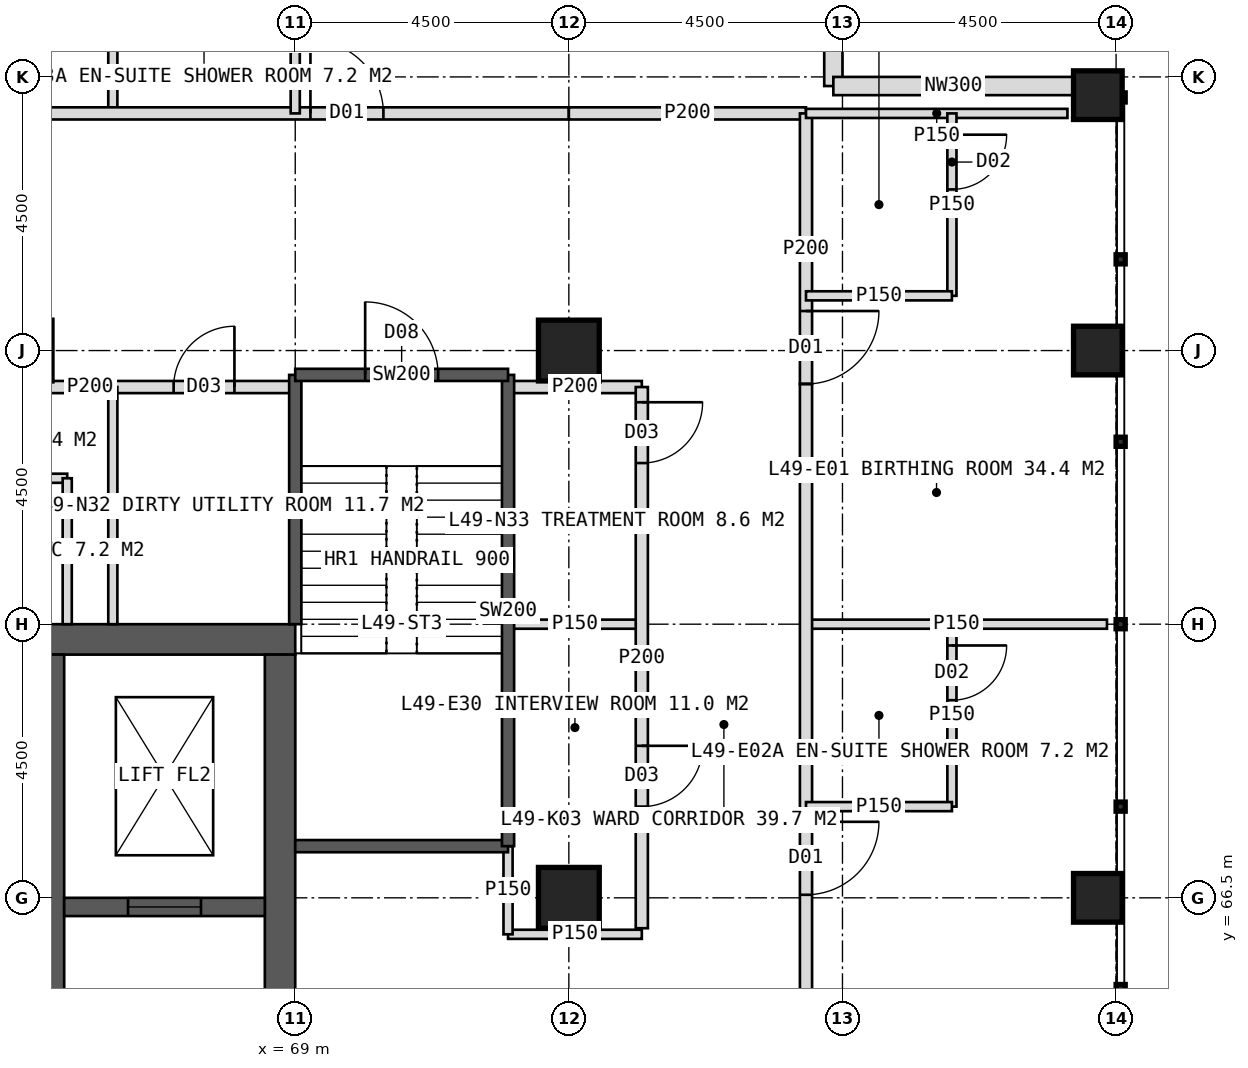
"""IFC4 building model, lengths in metres.
Left out: names, types, materials, properties, quantities, classifications, styles, units other than length and angle.
Written with IfcOpenShell. Run it as: python <this file> out.ifc"""

import sys

from ifc_helpers import new_model, si_unit, direction, frame, frame_2d, origin, origin_2d, place, context, subcontext, project, spatial, rectangle, hollow_rectangle, extrude, element, fill, save


model = new_model("IFC4")
c1 = context("Model", 3, precision=1e-05, world=origin(), true_north=direction((0.0, 1.0)))
c2 = subcontext(c1, "Body", "Model", "MODEL_VIEW")
j1 = project(units=[si_unit("LENGTHUNIT", "METRE"), si_unit("PLANEANGLEUNIT", "RADIAN")], contexts=[c1])
p1 = place(None, origin())
s1 = spatial("IfcSite", under=j1, at=p1, CompositionType="ELEMENT")
p2 = place(p1, origin())
s2 = spatial("IfcBuilding", under=s1, at=p2, CompositionType="ELEMENT")
p3 = place(p2, frame((0.0, 0.0, 205.0)))
s3 = spatial("IfcBuildingStorey", under=s2, at=p3, CompositionType="ELEMENT", Elevation=205.0)
p4 = place(p3, frame((51.0, 70.75, 0.0), z_axis=(0.0, 0.0, 1.0), x_axis=(1.0, 0.0, 0.0)))
e1 = element("IfcWall", 1, at=p4, inside=s3, PredefinedType="SHEAR", context=c2, shape_type="SweptSolid", body=[
    extrude(rectangle(XDim=18.0, YDim=0.5, at=frame_2d((9.0, 0.0))), origin(), (0.0, 0.0, 1.0), 4.0),
])
p5 = place(p4, frame((8.1, 0.0, 0.0)))
e2 = element("IfcOpeningElement", 2, at=p5, cuts=e1, PredefinedType="OPENING", context=c2, shape_type="SweptSolid", body=[
    extrude(rectangle(XDim=1.8, YDim=2.2, at=frame_2d((0.9, 1.1))), frame((0.0, 0.26, 0.0), z_axis=(0.0, -1.0, 0.0), x_axis=(1.0, 0.0, 0.0)), (0.0, 0.0, 1.0), 0.52),
])
p6 = place(p3, frame((68.75, 53.5, 0.0), z_axis=(0.0, 0.0, 1.0), x_axis=(0.0, 1.0, 0.0)))
e3 = element("IfcWall", 3, at=p6, inside=s3, PredefinedType="SHEAR", context=c2, shape_type="SweptSolid", body=[
    extrude(rectangle(XDim=17.0, YDim=0.5, at=frame_2d((8.5, 0.0))), origin(), (0.0, 0.0, 1.0), 4.0),
])
p7 = place(p6, frame((9.6, 0.0, 0.0)))
e4 = element("IfcOpeningElement", 4, at=p7, cuts=e3, PredefinedType="OPENING", context=c2, shape_type="SweptSolid", body=[
    extrude(rectangle(XDim=1.5, YDim=2.2, at=frame_2d((0.75, 1.1))), frame((0.0, 0.26, 0.0), z_axis=(0.0, -1.0, 0.0), x_axis=(1.0, 0.0, 0.0)), (0.0, 0.0, 1.0), 0.52),
])
p8 = place(p3, frame((65.05, 53.5, 0.0), z_axis=(0.0, 0.0, 1.0), x_axis=(0.0, 1.0, 0.0)))
e5 = element("IfcWall", 5, at=p8, inside=s3, PredefinedType="SHEAR", context=c2, shape_type="SweptSolid", body=[
    extrude(rectangle(XDim=17.0, YDim=0.3, at=frame_2d((8.5, 0.0))), origin(), (0.0, 0.0, 1.0), 4.0),
])
p9 = place(p3, frame((65.2, 66.35, 0.0), z_axis=(0.0, 0.0, 1.0), x_axis=(1.0, 0.0, 0.0)))
e6 = element("IfcWall", 6, at=p9, inside=s3, PredefinedType="SHEAR", context=c2, shape_type="SweptSolid", body=[
    extrude(rectangle(XDim=3.3, YDim=0.3, at=frame_2d((1.65, 0.0))), origin(), (0.0, 0.0, 1.0), 4.0),
])
p10 = place(p9, frame((1.05, 0.0, 0.0)))
e7 = element("IfcOpeningElement", 7, at=p10, cuts=e6, PredefinedType="OPENING", context=c2, shape_type="SweptSolid", body=[
    extrude(rectangle(XDim=1.2, YDim=2.2, at=frame_2d((0.6, 1.1))), frame((0.0, 0.16, 0.0), z_axis=(0.0, -1.0, 0.0), x_axis=(1.0, 0.0, 0.0)), (0.0, 0.0, 1.0), 0.32),
])
for number, where, z_axis, x_axis in (
    (8, (73.5, 75.5, 0.0), (0.0, 0.0, 1.0), (1.0, 0.0, 0.0)),
    (9, (73.5, 66.5, 0.0), (0.0, 0.0, 1.0), (1.0, 0.0, 0.0)),
):
    element("IfcColumn", number, at=place(p3, frame(where, z_axis=z_axis, x_axis=x_axis)), inside=s3, PredefinedType="COLUMN", context=c2, shape_type="SweptSolid", body=[
        extrude(hollow_rectangle(XDim=1.0, YDim=1.0, WallThickness=0.1, at=origin_2d()), origin(), (0.0, 0.0, 1.0), 4.0),
    ])
for number, where, z_axis, x_axis in (
    (10, (82.2, 66.5, 0.0), (0.0, 0.0, 1.0), (1.0, 0.0, 0.0)),
    (11, (82.2, 75.5, 0.0), (0.0, 0.0, 1.0), (1.0, 0.0, 0.0)),
    (12, (82.2, 79.7, 0.0), (0.0, 0.0, 1.0), (1.0, 0.0, 0.0)),
):
    element("IfcColumn", number, at=place(p3, frame(where, z_axis=z_axis, x_axis=x_axis)), inside=s3, PredefinedType="COLUMN", context=c2, shape_type="SweptSolid", body=[
        extrude(hollow_rectangle(XDim=0.8, YDim=0.8, WallThickness=0.08, at=origin_2d()), origin(), (0.0, 0.0, 1.0), 4.0),
    ])
for number, where, z_axis, x_axis in (
    (13, (77.85, 83.8, 0.0), (0.0, 0.0, 1.0), (0.0, -1.0, 0.0)),
    (14, (77.85, 79.85, 0.0), (0.0, 0.0, 1.0), (1.0, 0.0, 0.0)),
):
    element("IfcWall", number, at=place(p3, frame(where, z_axis=z_axis, x_axis=x_axis)), inside=s3, PredefinedType="ELEMENTEDWALL", context=c2, shape_type="SweptSolid", body=[
        extrude(rectangle(XDim=3.95, YDim=0.3, at=frame_2d((1.975, 0.0))), origin(), (0.0, 0.0, 1.0), 2.85),
    ])
p11 = place(p3, frame((66.0, 79.4, 0.0), z_axis=(0.0, 0.0, 1.0), x_axis=(0.0, 1.0, 0.0)))
e15 = element("IfcWall", 15, at=p11, inside=s3, PredefinedType="PARTITIONING", context=c2, shape_type="SweptSolid", body=[
    extrude(rectangle(XDim=4.95, YDim=0.15, at=frame_2d((2.475, 0.0))), origin(), (0.0, 0.0, 1.0), 3.75),
])
p12 = place(p3, frame((47.05, 79.4, 0.0), z_axis=(0.0, 0.0, 1.0), x_axis=(1.0, 0.0, 0.0)))
e16 = element("IfcWall", 16, at=p12, inside=s3, PredefinedType="PARTITIONING", context=c2, shape_type="SweptSolid", body=[
    extrude(rectangle(XDim=26.45, YDim=0.2, at=frame_2d((13.225, 0.0))), origin(), (0.0, 0.0, 1.0), 3.75),
])
p13 = place(p12, frame((12.45, 0.0, 0.0)))
e17 = element("IfcOpeningElement", 17, at=p13, cuts=e16, PredefinedType="OPENING", context=c2, shape_type="SweptSolid", body=[
    extrude(rectangle(XDim=1.0, YDim=2.1, at=frame_2d((0.5, 1.05))), frame((0.0, 0.11, 0.0), z_axis=(0.0, -1.0, 0.0), x_axis=(1.0, 0.0, 0.0)), (0.0, 0.0, 1.0), 0.22),
])
p14 = place(p12, frame((22.2, 0.0, 0.0)))
e18 = element("IfcOpeningElement", 18, at=p14, cuts=e16, PredefinedType="OPENING", context=c2, shape_type="SweptSolid", body=[
    extrude(rectangle(XDim=1.2, YDim=2.2, at=frame_2d((0.6, 1.1))), frame((0.0, 0.11, 0.0), z_axis=(0.0, -1.0, 0.0), x_axis=(1.0, 0.0, 0.0)), (0.0, 0.0, 1.0), 0.22),
])
p15 = place(p3, frame((73.5, 79.4, 0.0), z_axis=(0.0, 0.0, 1.0), x_axis=(1.0, 0.0, 0.0)))
e19 = element("IfcWall", 19, at=p15, inside=s3, PredefinedType="PARTITIONING", context=c2, shape_type="SweptSolid", body=[
    extrude(rectangle(XDim=3.9, YDim=0.2, at=frame_2d((1.95, 0.0))), origin(), (0.0, 0.0, 1.0), 2.85),
])
p16 = place(p3, frame((69.0, 79.4, 0.0), z_axis=(0.0, 0.0, 1.0), x_axis=(0.0, 1.0, 0.0)))
e20 = element("IfcWall", 20, at=p16, inside=s3, PredefinedType="PARTITIONING", context=c2, shape_type="SweptSolid", body=[
    extrude(rectangle(XDim=2.4, YDim=0.15, at=frame_2d((1.2, 0.0))), origin(), (0.0, 0.0, 1.0), 3.75),
])
p17 = place(p3, frame((62.25, 74.9, 0.0), z_axis=(0.0, 0.0, 1.0), x_axis=(1.0, 0.0, 0.0)))
e21 = element("IfcWall", 21, at=p17, inside=s3, PredefinedType="PARTITIONING", context=c2, shape_type="SweptSolid", body=[
    extrude(rectangle(XDim=6.75, YDim=0.2, at=frame_2d((3.375, 0.0))), origin(), (0.0, 0.0, 1.0), 3.75),
])
p18 = place(p17, frame((0.325, 0.0, 0.0)))
e22 = element("IfcOpeningElement", 22, at=p18, cuts=e21, PredefinedType="OPENING", context=c2, shape_type="SweptSolid", body=[
    extrude(rectangle(XDim=1.0, YDim=2.1, at=frame_2d((0.5, 1.05))), frame((0.0, 0.11, 0.0), z_axis=(0.0, -1.0, 0.0), x_axis=(1.0, 0.0, 0.0)), (0.0, 0.0, 1.0), 0.22),
])
p19 = place(p17, frame((4.75, 0.0, 0.0)))
e23 = element("IfcOpeningElement", 23, at=p19, cuts=e21, PredefinedType="OPENING", context=c2, shape_type="SweptSolid", body=[
    extrude(rectangle(XDim=1.0, YDim=2.1, at=frame_2d((0.5, 1.05))), frame((0.0, 0.11, 0.0), z_axis=(0.0, -1.0, 0.0), x_axis=(1.0, 0.0, 0.0)), (0.0, 0.0, 1.0), 0.22),
])
p20 = place(p3, frame((72.5, 74.9, 0.0), z_axis=(0.0, 0.0, 1.0), x_axis=(1.0, 0.0, 0.0)))
e24 = element("IfcWall", 24, at=p20, inside=s3, PredefinedType="PARTITIONING", context=c2, shape_type="SweptSolid", body=[
    extrude(rectangle(XDim=2.2, YDim=0.2, at=frame_2d((1.1, 0.0))), origin(), (0.0, 0.0, 1.0), 3.75),
])
p21 = place(p3, frame((66.0, 71.0, 0.0), z_axis=(0.0, 0.0, 1.0), x_axis=(0.0, 1.0, 0.0)))
e25 = element("IfcWall", 25, at=p21, inside=s3, PredefinedType="PARTITIONING", context=c2, shape_type="SweptSolid", body=[
    extrude(rectangle(XDim=3.9, YDim=0.15, at=frame_2d((1.95, 0.0))), origin(), (0.0, 0.0, 1.0), 3.75),
])
p22 = place(p3, frame((62.25, 73.4, 0.0), z_axis=(0.0, 0.0, 1.0), x_axis=(1.0, 0.0, 0.0)))
e26 = element("IfcWall", 26, at=p22, inside=s3, PredefinedType="PARTITIONING", context=c2, shape_type="SweptSolid", body=[
    extrude(rectangle(XDim=3.0, YDim=0.15, at=frame_2d((1.5, 0.0))), origin(), (0.0, 0.0, 1.0), 3.75),
])
p23 = place(p3, frame((65.25, 71.0, 0.0), z_axis=(0.0, 0.0, 1.0), x_axis=(0.0, 1.0, 0.0)))
e27 = element("IfcWall", 27, at=p23, inside=s3, PredefinedType="PARTITIONING", context=c2, shape_type="SweptSolid", body=[
    extrude(rectangle(XDim=2.4, YDim=0.15, at=frame_2d((1.2, 0.0))), origin(), (0.0, 0.0, 1.0), 3.75),
])
p24 = place(p3, frame((77.4, 71.0, 0.0), z_axis=(0.0, 0.0, 1.0), x_axis=(1.0, 0.0, 0.0)))
e28 = element("IfcWall", 28, at=p24, inside=s3, PredefinedType="PARTITIONING", context=c2, shape_type="SweptSolid", body=[
    extrude(rectangle(XDim=4.95, YDim=0.15, at=frame_2d((2.475, 0.0))), origin(), (0.0, 0.0, 1.0), 3.75),
])
p25 = place(p3, frame((77.4, 79.4, 0.0), z_axis=(0.0, 0.0, 1.0), x_axis=(0.0, -1.0, 0.0)))
e29 = element("IfcWall", 29, at=p25, inside=s3, PredefinedType="PARTITIONING", context=c2, shape_type="SweptSolid", body=[
    extrude(rectangle(XDim=4.45, YDim=0.2, at=frame_2d((2.225, 0.0))), origin(), (0.0, 0.0, 1.0), 2.85),
])
p26 = place(p25, frame((3.25, 0.0, 0.0)))
e30 = element("IfcOpeningElement", 30, at=p26, cuts=e29, PredefinedType="OPENING", context=c2, shape_type="SweptSolid", body=[
    extrude(rectangle(XDim=1.2, YDim=2.2, at=frame_2d((0.6, 1.1))), frame((0.0, 0.11, 0.0), z_axis=(0.0, -1.0, 0.0), x_axis=(1.0, 0.0, 0.0)), (0.0, 0.0, 1.0), 0.22),
])
p27 = place(p3, frame((77.4, 74.95, 0.0), z_axis=(0.0, 0.0, 1.0), x_axis=(0.0, -1.0, 0.0)))
e31 = element("IfcWall", 31, at=p27, inside=s3, PredefinedType="PARTITIONING", context=c2, shape_type="SweptSolid", body=[
    extrude(rectangle(XDim=26.45, YDim=0.2, at=frame_2d((13.225, 0.0))), origin(), (0.0, 0.0, 1.0), 3.75),
])
p28 = place(p27, frame((7.2, 0.0, 0.0)))
e32 = element("IfcOpeningElement", 32, at=p28, cuts=e31, PredefinedType="OPENING", context=c2, shape_type="SweptSolid", body=[
    extrude(rectangle(XDim=1.2, YDim=2.2, at=frame_2d((0.6, 1.1))), frame((0.0, 0.11, 0.0), z_axis=(0.0, -1.0, 0.0), x_axis=(1.0, 0.0, 0.0)), (0.0, 0.0, 1.0), 0.22),
])
p29 = place(p27, frame((16.2, 0.0, 0.0)))
e33 = element("IfcOpeningElement", 33, at=p29, cuts=e31, PredefinedType="OPENING", context=c2, shape_type="SweptSolid", body=[
    extrude(rectangle(XDim=1.2, YDim=2.2, at=frame_2d((0.6, 1.1))), frame((0.0, 0.11, 0.0), z_axis=(0.0, -1.0, 0.0), x_axis=(1.0, 0.0, 0.0)), (0.0, 0.0, 1.0), 0.22),
])
p30 = place(p27, frame((25.2, 0.0, 0.0)))
e34 = element("IfcOpeningElement", 34, at=p30, cuts=e31, PredefinedType="OPENING", context=c2, shape_type="SweptSolid", body=[
    extrude(rectangle(XDim=1.2, YDim=2.2, at=frame_2d((0.6, 1.1))), frame((0.0, 0.11, 0.0), z_axis=(0.0, -1.0, 0.0), x_axis=(1.0, 0.0, 0.0)), (0.0, 0.0, 1.0), 0.22),
])
p31 = place(p3, frame((77.4, 79.4, 0.0), z_axis=(0.0, 0.0, 1.0), x_axis=(1.0, 0.0, 0.0)))
e35 = element("IfcWall", 35, at=p31, inside=s3, PredefinedType="PARTITIONING", context=c2, shape_type="SweptSolid", body=[
    extrude(rectangle(XDim=4.3, YDim=0.15, at=frame_2d((2.15, 0.0))), origin(), (0.0, 0.0, 1.0), 2.85),
])
p32 = place(p3, frame((79.8, 79.4, 0.0), z_axis=(0.0, 0.0, 1.0), x_axis=(0.0, -1.0, 0.0)))
e36 = element("IfcWall", 36, at=p32, inside=s3, PredefinedType="PARTITIONING", context=c2, shape_type="SweptSolid", body=[
    extrude(rectangle(XDim=3.0, YDim=0.15, at=frame_2d((1.5, 0.0))), origin(), (0.0, 0.0, 1.0), 3.75),
])
p33 = place(p32, frame((0.35, 0.0, 0.0)))
e37 = element("IfcOpeningElement", 37, at=p33, cuts=e36, PredefinedType="OPENING", context=c2, shape_type="SweptSolid", body=[
    extrude(rectangle(XDim=0.9, YDim=2.1, at=frame_2d((0.45, 1.05))), frame((0.0, 0.085, 0.0), z_axis=(0.0, -1.0, 0.0), x_axis=(1.0, 0.0, 0.0)), (0.0, 0.0, 1.0), 0.17),
])
p34 = place(p3, frame((77.4, 76.4, 0.0), z_axis=(0.0, 0.0, 1.0), x_axis=(1.0, 0.0, 0.0)))
e38 = element("IfcWall", 38, at=p34, inside=s3, PredefinedType="PARTITIONING", context=c2, shape_type="SweptSolid", body=[
    extrude(rectangle(XDim=2.4, YDim=0.15, at=frame_2d((1.2, 0.0))), origin(), (0.0, 0.0, 1.0), 3.75),
])
p35 = place(p3, frame((79.8, 71.0, 0.0), z_axis=(0.0, 0.0, 1.0), x_axis=(0.0, -1.0, 0.0)))
e39 = element("IfcWall", 39, at=p35, inside=s3, PredefinedType="PARTITIONING", context=c2, shape_type="SweptSolid", body=[
    extrude(rectangle(XDim=3.0, YDim=0.15, at=frame_2d((1.5, 0.0))), origin(), (0.0, 0.0, 1.0), 3.75),
])
p36 = place(p35, frame((0.35, 0.0, 0.0)))
e40 = element("IfcOpeningElement", 40, at=p36, cuts=e39, PredefinedType="OPENING", context=c2, shape_type="SweptSolid", body=[
    extrude(rectangle(XDim=0.9, YDim=2.1, at=frame_2d((0.45, 1.05))), frame((0.0, 0.085, 0.0), z_axis=(0.0, -1.0, 0.0), x_axis=(1.0, 0.0, 0.0)), (0.0, 0.0, 1.0), 0.17),
])
p37 = place(p3, frame((77.4, 68.0, 0.0), z_axis=(0.0, 0.0, 1.0), x_axis=(1.0, 0.0, 0.0)))
e41 = element("IfcWall", 41, at=p37, inside=s3, PredefinedType="PARTITIONING", context=c2, shape_type="SweptSolid", body=[
    extrude(rectangle(XDim=2.4, YDim=0.15, at=frame_2d((1.2, 0.0))), origin(), (0.0, 0.0, 1.0), 3.75),
])
p38 = place(p3, frame((72.5, 71.0, 0.0), z_axis=(0.0, 0.0, 1.0), x_axis=(1.0, 0.0, 0.0)))
e42 = element("IfcWall", 42, at=p38, inside=s3, PredefinedType="PARTITIONING", context=c2, shape_type="SweptSolid", body=[
    extrude(rectangle(XDim=2.2, YDim=0.15, at=frame_2d((1.1, 0.0))), origin(), (0.0, 0.0, 1.0), 3.75),
])
p39 = place(p3, frame((74.7, 74.9, 0.0), z_axis=(0.0, 0.0, 1.0), x_axis=(0.0, -1.0, 0.0)))
e43 = element("IfcWall", 43, at=p39, inside=s3, PredefinedType="PARTITIONING", context=c2, shape_type="SweptSolid", body=[
    extrude(rectangle(XDim=8.9, YDim=0.2, at=frame_2d((4.45, 0.0))), origin(), (0.0, 0.0, 1.0), 3.75),
])
p40 = place(p39, frame((0.25, 0.0, 0.0)))
e44 = element("IfcOpeningElement", 44, at=p40, cuts=e43, PredefinedType="OPENING", context=c2, shape_type="SweptSolid", body=[
    extrude(rectangle(XDim=1.0, YDim=2.1, at=frame_2d((0.5, 1.05))), frame((0.0, 0.11, 0.0), z_axis=(0.0, -1.0, 0.0), x_axis=(1.0, 0.0, 0.0)), (0.0, 0.0, 1.0), 0.22),
])
p41 = place(p39, frame((5.9, 0.0, 0.0)))
e45 = element("IfcOpeningElement", 45, at=p41, cuts=e43, PredefinedType="OPENING", context=c2, shape_type="SweptSolid", body=[
    extrude(rectangle(XDim=1.0, YDim=2.1, at=frame_2d((0.5, 1.05))), frame((0.0, 0.11, 0.0), z_axis=(0.0, -1.0, 0.0), x_axis=(1.0, 0.0, 0.0)), (0.0, 0.0, 1.0), 0.22),
])
p42 = place(p3, frame((72.5, 65.9, 0.0), z_axis=(0.0, 0.0, 1.0), x_axis=(1.0, 0.0, 0.0)))
e46 = element("IfcWall", 46, at=p42, inside=s3, PredefinedType="PARTITIONING", context=c2, shape_type="SweptSolid", body=[
    extrude(rectangle(XDim=2.2, YDim=0.15, at=frame_2d((1.1, 0.0))), origin(), (0.0, 0.0, 1.0), 3.75),
])
p43 = place(p3, frame((72.5, 65.9, 0.0), z_axis=(0.0, 0.0, 1.0), x_axis=(0.0, 1.0, 0.0)))
e47 = element("IfcWall", 47, at=p43, inside=s3, PredefinedType="PARTITIONING", context=c2, shape_type="SweptSolid", body=[
    extrude(rectangle(XDim=1.45, YDim=0.15, at=frame_2d((0.725, 0.0))), origin(), (0.0, 0.0, 1.0), 3.75),
])
p44 = place(p3, frame((69.0, 71.0, 0.0), z_axis=(0.0, 0.0, 1.0), x_axis=(0.0, 1.0, 0.0)))
e48 = element("IfcWall", 48, at=p44, inside=s3, PredefinedType="SOLIDWALL", context=c2, shape_type="SweptSolid", body=[
    extrude(rectangle(XDim=4.1, YDim=0.2, at=frame_2d((2.05, 0.0))), origin(), (0.0, 0.0, 1.0), 3.75),
])
p45 = place(p3, frame((69.0, 67.35, 0.0), z_axis=(0.0, 0.0, 1.0), x_axis=(1.0, 0.0, 0.0)))
e49 = element("IfcWall", 49, at=p45, inside=s3, PredefinedType="SOLIDWALL", context=c2, shape_type="SweptSolid", body=[
    extrude(rectangle(XDim=3.5, YDim=0.2, at=frame_2d((1.75, 0.0))), origin(), (0.0, 0.0, 1.0), 3.75),
])
p46 = place(p3, frame((72.5, 67.35, 0.0), z_axis=(0.0, 0.0, 1.0), x_axis=(0.0, 1.0, 0.0)))
e50 = element("IfcWall", 50, at=p46, inside=s3, PredefinedType="SOLIDWALL", context=c2, shape_type="SweptSolid", body=[
    extrude(rectangle(XDim=7.75, YDim=0.2, at=frame_2d((3.875, 0.0))), origin(), (0.0, 0.0, 1.0), 3.75),
])
p47 = place(p3, frame((69.0, 75.1, 0.0), z_axis=(0.0, 0.0, 1.0), x_axis=(1.0, 0.0, 0.0)))
e51 = element("IfcWall", 51, at=p47, inside=s3, PredefinedType="SOLIDWALL", context=c2, shape_type="SweptSolid", body=[
    extrude(rectangle(XDim=3.5, YDim=0.2, at=frame_2d((1.75, 0.0))), origin(), (0.0, 0.0, 1.0), 3.75),
])
p48 = place(p47, frame((1.15, 0.0, 0.0)))
e52 = element("IfcOpeningElement", 52, at=p48, cuts=e51, PredefinedType="OPENING", context=c2, shape_type="SweptSolid", body=[
    extrude(rectangle(XDim=1.2, YDim=2.1, at=frame_2d((0.6, 1.05))), frame((0.0, 0.11, 0.0), z_axis=(0.0, -1.0, 0.0), x_axis=(1.0, 0.0, 0.0)), (0.0, 0.0, 1.0), 0.22),
])
p49 = place(p14, origin())
e53 = element("IfcDoor", 53, at=p49, inside=s3, OperationType="SINGLE_SWING_LEFT", PredefinedType="DOOR", context=c2, shape_type="SweptSolid", body=[
    extrude(rectangle(XDim=1.2, YDim=2.2, at=frame_2d((0.6, 1.1))), frame((0.0, 0.025, 0.0), z_axis=(0.0, -1.0, 0.0), x_axis=(1.0, 0.0, 0.0)), (0.0, 0.0, 1.0), 0.05),
])
fill(e18, e53)
p50 = place(p19, origin())
e54 = element("IfcDoor", 54, at=p50, inside=s3, OperationType="SINGLE_SWING_RIGHT", PredefinedType="DOOR", context=c2, shape_type="SweptSolid", body=[
    extrude(rectangle(XDim=1.0, YDim=2.1, at=frame_2d((0.5, 1.05))), frame((0.0, 0.025, 0.0), z_axis=(0.0, -1.0, 0.0), x_axis=(1.0, 0.0, 0.0)), (0.0, 0.0, 1.0), 0.05),
])
fill(e23, e54)
p51 = place(p40, origin())
e55 = element("IfcDoor", 55, at=p51, inside=s3, OperationType="SINGLE_SWING_LEFT", PredefinedType="DOOR", context=c2, shape_type="SweptSolid", body=[
    extrude(rectangle(XDim=1.0, YDim=2.1, at=frame_2d((0.5, 1.05))), frame((0.0, 0.025, 0.0), z_axis=(0.0, -1.0, 0.0), x_axis=(1.0, 0.0, 0.0)), (0.0, 0.0, 1.0), 0.05),
])
fill(e44, e55)
p52 = place(p26, origin())
e56 = element("IfcDoor", 56, at=p52, inside=s3, OperationType="SINGLE_SWING_LEFT", PredefinedType="DOOR", context=c2, shape_type="SweptSolid", body=[
    extrude(rectangle(XDim=1.2, YDim=2.2, at=frame_2d((0.6, 1.1))), frame((0.0, 0.025, 0.0), z_axis=(0.0, -1.0, 0.0), x_axis=(1.0, 0.0, 0.0)), (0.0, 0.0, 1.0), 0.05),
])
fill(e30, e56)
p53 = place(p33, origin())
e57 = element("IfcDoor", 57, at=p53, inside=s3, OperationType="SINGLE_SWING_LEFT", PredefinedType="DOOR", context=c2, shape_type="SweptSolid", body=[
    extrude(rectangle(XDim=0.9, YDim=2.1, at=frame_2d((0.45, 1.05))), frame((0.0, 0.025, 0.0), z_axis=(0.0, -1.0, 0.0), x_axis=(1.0, 0.0, 0.0)), (0.0, 0.0, 1.0), 0.05),
])
fill(e37, e57)
p54 = place(p28, origin())
e58 = element("IfcDoor", 58, at=p54, inside=s3, OperationType="SINGLE_SWING_LEFT", PredefinedType="DOOR", context=c2, shape_type="SweptSolid", body=[
    extrude(rectangle(XDim=1.2, YDim=2.2, at=frame_2d((0.6, 1.1))), frame((0.0, 0.025, 0.0), z_axis=(0.0, -1.0, 0.0), x_axis=(1.0, 0.0, 0.0)), (0.0, 0.0, 1.0), 0.05),
])
fill(e32, e58)
p55 = place(p36, origin())
e59 = element("IfcDoor", 59, at=p55, inside=s3, OperationType="SINGLE_SWING_LEFT", PredefinedType="DOOR", context=c2, shape_type="SweptSolid", body=[
    extrude(rectangle(XDim=0.9, YDim=2.1, at=frame_2d((0.45, 1.05))), frame((0.0, 0.025, 0.0), z_axis=(0.0, -1.0, 0.0), x_axis=(1.0, 0.0, 0.0)), (0.0, 0.0, 1.0), 0.05),
])
fill(e40, e59)
p56 = place(p41, origin())
e60 = element("IfcDoor", 60, at=p56, inside=s3, OperationType="SINGLE_SWING_LEFT", PredefinedType="DOOR", context=c2, shape_type="SweptSolid", body=[
    extrude(rectangle(XDim=1.0, YDim=2.1, at=frame_2d((0.5, 1.05))), frame((0.0, 0.025, 0.0), z_axis=(0.0, -1.0, 0.0), x_axis=(1.0, 0.0, 0.0)), (0.0, 0.0, 1.0), 0.05),
])
fill(e45, e60)
p57 = place(p10, origin())
e61 = element("IfcDoor", 61, at=p57, inside=s3, OperationType="SLIDING_TO_LEFT", PredefinedType="DOOR", context=c2, shape_type="SweptSolid", body=[
    extrude(rectangle(XDim=1.2, YDim=2.2, at=frame_2d((0.6, 1.1))), frame((0.0, 0.025, 0.0), z_axis=(0.0, -1.0, 0.0), x_axis=(1.0, 0.0, 0.0)), (0.0, 0.0, 1.0), 0.05),
])
fill(e7, e61)
p58 = place(p48, origin())
e62 = element("IfcDoor", 62, at=p58, inside=s3, OperationType="SINGLE_SWING_LEFT", PredefinedType="DOOR", context=c2, shape_type="SweptSolid", body=[
    extrude(rectangle(XDim=1.2, YDim=2.1, at=frame_2d((0.6, 1.05))), frame((0.0, 0.025, 0.0), z_axis=(0.0, -1.0, 0.0), x_axis=(1.0, 0.0, 0.0)), (0.0, 0.0, 1.0), 0.05),
])
fill(e52, e62)
save(model, sys.argv[1])
